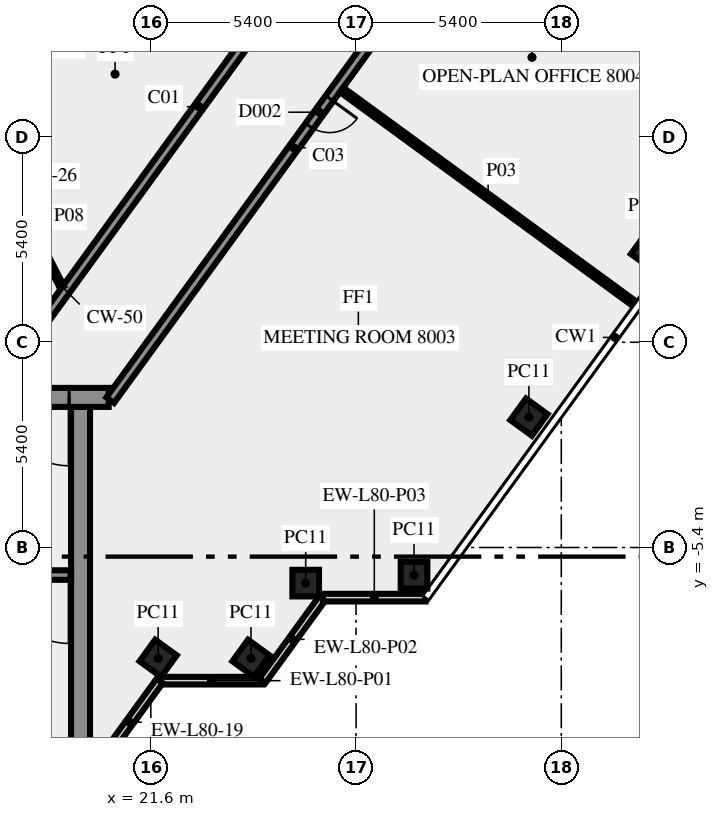
"""IFC4 building model, lengths in metres.
Left out: names, types, materials, properties, quantities, classifications, styles, units other than length and angle.
Written with IfcOpenShell. Run it as: python <this file> out.ifc"""

import sys

from ifc_helpers import new_model, si_unit, direction, frame, frame_2d, origin, origin_2d, place, context, subcontext, project, spatial, rectangle, extrude, element, fill, save


model = new_model("IFC4")
c1 = context("Model", 3, precision=1e-05, world=origin(), true_north=direction((0.0, 1.0)))
c2 = subcontext(c1, "Body", "Model", "MODEL_VIEW")
j1 = project(units=[si_unit("LENGTHUNIT", "METRE"), si_unit("PLANEANGLEUNIT", "RADIAN")], contexts=[c1])
p1 = place(None, origin())
s1 = spatial("IfcSite", under=j1, at=p1, CompositionType="ELEMENT")
p2 = place(p1, origin())
s2 = spatial("IfcBuilding", under=s1, at=p2, CompositionType="ELEMENT")
p3 = place(p2, frame((0.0, 0.0, 343.0)))
s3 = spatial("IfcBuildingStorey", under=s2, at=p3, CompositionType="ELEMENT", Elevation=343.0)
for number, where, z_axis, x_axis in (
    (1, (21.792, -8.315, 0.0), (0.0, 0.0, 1.0), (0.588, 0.809, 0.0)),
    (2, (24.235, -8.315, 0.0), (0.0, 0.0, 1.0), (0.588, 0.809, 0.0)),
    (3, (25.674, -6.337, 0.0), (0.0, 0.0, 1.0), (1.0, 0.0, 0.0)),
    (4, (28.525, -6.13, 0.0), (0.0, 0.0, 1.0), (1.0, 0.0, 0.0)),
    (5, (31.548, -1.969, 0.0), (0.0, 0.0, 1.0), (0.588, 0.809, 0.0)),
    (6, (34.722, 2.4, 0.0), (0.0, 0.0, 1.0), (0.588, 0.809, 0.0)),
):
    element("IfcColumn", number, at=place(p3, frame(where, z_axis=z_axis, x_axis=x_axis)), inside=s3, PredefinedType="COLUMN", context=c2, shape_type="SweptSolid", body=[
        extrude(rectangle(XDim=0.7, YDim=0.7, at=origin_2d()), origin(), (0.0, 0.0, 1.0), 3.65),
    ])
p4 = place(p3, frame((21.843, -8.904, 0.0), z_axis=(0.0, 0.0, 1.0), x_axis=(1.0, 0.0, 0.0)))
e7 = element("IfcWall", 7, at=p4, inside=s3, PredefinedType="SOLIDWALL", context=c2, shape_type="SweptSolid", body=[
    extrude(rectangle(XDim=2.7, YDim=0.2, at=frame_2d((1.35, 0.0))), origin(), (0.0, 0.0, 1.0), 3.65),
])
p5 = place(p3, frame((24.533, -8.909, 0.0), z_axis=(0.0, 0.0, 1.0), x_axis=(0.587720002413, 0.809064397168, 0.0)))
e8 = element("IfcWall", 8, at=p5, inside=s3, PredefinedType="SOLIDWALL", context=c2, shape_type="SweptSolid", body=[
    extrude(rectangle(XDim=2.7, YDim=0.2, at=frame_2d((1.35, 0.0))), origin(), (0.0, 0.0, 1.0), 3.65),
])
p6 = place(p3, frame((26.13, -6.719, 0.0), z_axis=(0.0, 0.0, 1.0), x_axis=(1.0, 0.0, 0.0)))
e9 = element("IfcWall", 9, at=p6, inside=s3, PredefinedType="SOLIDWALL", context=c2, shape_type="SweptSolid", body=[
    extrude(rectangle(XDim=2.7, YDim=0.2, at=frame_2d((1.35, 0.0))), origin(), (0.0, 0.0, 1.0), 3.65),
])
p7 = place(p3, frame((20.253, -11.083, 0.0), z_axis=(0.0, 0.0, 1.0), x_axis=(0.587766567315, 0.809030569476, 0.0)))
e10 = element("IfcWall", 10, at=p7, inside=s3, PredefinedType="SOLIDWALL", context=c2, shape_type="SweptSolid", body=[
    extrude(rectangle(XDim=2.688, YDim=0.2, at=frame_2d((1.344, 0.0))), origin(), (0.0, 0.0, 1.0), 3.65),
])
p8 = place(p3, frame((19.75, -10.5, 0.0), z_axis=(0.0, 0.0, 1.0), x_axis=(0.0, 1.0, 0.0)))
e11 = element("IfcWall", 11, at=p8, inside=s3, PredefinedType="SHEAR", context=c2, shape_type="SweptSolid", body=[
    extrude(rectangle(XDim=8.8, YDim=0.5, at=frame_2d((4.4, 0.0))), origin(), (0.0, 0.0, 1.0), 3.65),
])
p9 = place(p3, frame((19.5, -6.125, 0.0), z_axis=(0.0, 0.0, 1.0), x_axis=(-1.0, 0.0, 0.0)))
e12 = element("IfcWall", 12, at=p9, inside=s3, PredefinedType="SHEAR", context=c2, shape_type="SweptSolid", body=[
    extrude(rectangle(XDim=8.05, YDim=0.25, at=frame_2d((4.025, 0.0))), origin(), (0.0, 0.0, 1.0), 3.65),
])
p10 = place(p9, frame((0.05, 0.0, 0.0)))
e13 = element("IfcOpeningElement", 13, at=p10, cuts=e12, PredefinedType="OPENING", context=c2, shape_type="SweptSolid", body=[
    extrude(rectangle(XDim=1.8, YDim=2.1, at=frame_2d((0.9, 1.05))), frame((0.0, 0.135, 0.0), z_axis=(0.0, -1.0, 0.0), x_axis=(1.0, 0.0, 0.0)), (0.0, 0.0, 1.0), 0.27),
])
p11 = place(p3, frame((20.49, -1.45, 0.0), z_axis=(0.0, 0.0, 1.0), x_axis=(-1.0, 0.0, 0.0)))
e14 = element("IfcWall", 14, at=p11, inside=s3, PredefinedType="SHEAR", context=c2, shape_type="SweptSolid", body=[
    extrude(rectangle(XDim=40.98, YDim=0.5, at=frame_2d((20.49, 0.0))), origin(), (0.0, 0.0, 1.0), 3.65),
])
p12 = place(p11, frame((38.14, 0.0, 0.0)))
e15 = element("IfcOpeningElement", 15, at=p12, cuts=e14, PredefinedType="OPENING", context=c2, shape_type="SweptSolid", body=[
    extrude(rectangle(XDim=1.8, YDim=2.1, at=frame_2d((0.9, 1.05))), frame((0.0, 0.26, 0.0), z_axis=(0.0, -1.0, 0.0), x_axis=(1.0, 0.0, 0.0)), (0.0, 0.0, 1.0), 0.52),
])
p13 = place(p11, frame((36.728, 0.0, 0.0)))
e16 = element("IfcOpeningElement", 16, at=p13, cuts=e14, PredefinedType="OPENING", context=c2, shape_type="SweptSolid", body=[
    extrude(rectangle(XDim=0.8, YDim=2.1, at=frame_2d((0.4, 1.05))), frame((0.0, 0.26, 0.0), z_axis=(0.0, -1.0, 0.0), x_axis=(1.0, 0.0, 0.0)), (0.0, 0.0, 1.0), 0.52),
])
p14 = place(p11, frame((35.153, 0.0, 0.0)))
e17 = element("IfcOpeningElement", 17, at=p14, cuts=e14, PredefinedType="OPENING", context=c2, shape_type="SweptSolid", body=[
    extrude(rectangle(XDim=0.8, YDim=2.1, at=frame_2d((0.4, 1.05))), frame((0.0, 0.26, 0.0), z_axis=(0.0, -1.0, 0.0), x_axis=(1.0, 0.0, 0.0)), (0.0, 0.0, 1.0), 0.52),
])
p15 = place(p11, frame((32.94, 0.0, 0.0)))
e18 = element("IfcOpeningElement", 18, at=p15, cuts=e14, PredefinedType="OPENING", context=c2, shape_type="SweptSolid", body=[
    extrude(rectangle(XDim=0.9, YDim=2.1, at=frame_2d((0.45, 1.05))), frame((0.0, 0.26, 0.0), z_axis=(0.0, -1.0, 0.0), x_axis=(1.0, 0.0, 0.0)), (0.0, 0.0, 1.0), 0.52),
])
p16 = place(p11, frame((31.015, 0.0, 0.0)))
e19 = element("IfcOpeningElement", 19, at=p16, cuts=e14, PredefinedType="OPENING", context=c2, shape_type="SweptSolid", body=[
    extrude(rectangle(XDim=0.8, YDim=2.1, at=frame_2d((0.4, 1.05))), frame((0.0, 0.26, 0.0), z_axis=(0.0, -1.0, 0.0), x_axis=(1.0, 0.0, 0.0)), (0.0, 0.0, 1.0), 0.52),
])
p17 = place(p11, frame((24.765, 0.0, 0.0)))
e20 = element("IfcOpeningElement", 20, at=p17, cuts=e14, PredefinedType="OPENING", context=c2, shape_type="SweptSolid", body=[
    extrude(rectangle(XDim=0.8, YDim=2.1, at=frame_2d((0.4, 1.05))), frame((0.0, 0.26, 0.0), z_axis=(0.0, -1.0, 0.0), x_axis=(1.0, 0.0, 0.0)), (0.0, 0.0, 1.0), 0.52),
])
p18 = place(p11, frame((21.765, 0.0, 0.0)))
e21 = element("IfcOpeningElement", 21, at=p18, cuts=e14, PredefinedType="OPENING", context=c2, shape_type="SweptSolid", body=[
    extrude(rectangle(XDim=2.0, YDim=2.1, at=frame_2d((1.0, 1.05))), frame((0.0, 0.26, 0.0), z_axis=(0.0, -1.0, 0.0), x_axis=(1.0, 0.0, 0.0)), (0.0, 0.0, 1.0), 0.52),
])
p19 = place(p11, frame((14.002, 0.0, 0.0)))
e22 = element("IfcOpeningElement", 22, at=p19, cuts=e14, PredefinedType="OPENING", context=c2, shape_type="SweptSolid", body=[
    extrude(rectangle(XDim=0.9, YDim=2.1, at=frame_2d((0.45, 1.05))), frame((0.0, 0.26, 0.0), z_axis=(0.0, -1.0, 0.0), x_axis=(1.0, 0.0, 0.0)), (0.0, 0.0, 1.0), 0.52),
])
p20 = place(p11, frame((10.278, 0.0, 0.0)))
e23 = element("IfcOpeningElement", 23, at=p20, cuts=e14, PredefinedType="OPENING", context=c2, shape_type="SweptSolid", body=[
    extrude(rectangle(XDim=0.9, YDim=2.1, at=frame_2d((0.45, 1.05))), frame((0.0, 0.26, 0.0), z_axis=(0.0, -1.0, 0.0), x_axis=(1.0, 0.0, 0.0)), (0.0, 0.0, 1.0), 0.52),
])
p21 = place(p11, frame((7.14, 0.0, 0.0)))
e24 = element("IfcOpeningElement", 24, at=p21, cuts=e14, PredefinedType="OPENING", context=c2, shape_type="SweptSolid", body=[
    extrude(rectangle(XDim=0.9, YDim=2.1, at=frame_2d((0.45, 1.05))), frame((0.0, 0.26, 0.0), z_axis=(0.0, -1.0, 0.0), x_axis=(1.0, 0.0, 0.0)), (0.0, 0.0, 1.0), 0.52),
])
p22 = place(p11, frame((4.19, 0.0, 0.0)))
e25 = element("IfcOpeningElement", 25, at=p22, cuts=e14, PredefinedType="OPENING", context=c2, shape_type="SweptSolid", body=[
    extrude(rectangle(XDim=0.9, YDim=2.1, at=frame_2d((0.45, 1.05))), frame((0.0, 0.26, 0.0), z_axis=(0.0, -1.0, 0.0), x_axis=(1.0, 0.0, 0.0)), (0.0, 0.0, 1.0), 0.52),
])
p23 = place(p11, frame((1.04, 0.0, 0.0)))
e26 = element("IfcOpeningElement", 26, at=p23, cuts=e14, PredefinedType="OPENING", context=c2, shape_type="SweptSolid", body=[
    extrude(rectangle(XDim=1.8, YDim=2.1, at=frame_2d((0.9, 1.05))), frame((0.0, 0.26, 0.0), z_axis=(0.0, -1.0, 0.0), x_axis=(1.0, 0.0, 0.0)), (0.0, 0.0, 1.0), 0.52),
])
p24 = place(p3, frame((17.545, -1.125, 0.0), z_axis=(0.0, 0.0, 1.0), x_axis=(0.58779555165, 0.809009511354, 0.0)))
e27 = element("IfcWall", 27, at=p24, inside=s3, PredefinedType="SOLIDWALL", context=c2, shape_type="SweptSolid", body=[
    extrude(rectangle(XDim=18.103, YDim=0.25, at=frame_2d((9.052, 0.0))), origin(), (0.0, 0.0, 1.0), 3.65),
])
p25 = place(p24, frame((16.728, 0.0, 0.0)))
e28 = element("IfcOpeningElement", 28, at=p25, cuts=e27, PredefinedType="OPENING", context=c2, shape_type="SweptSolid", body=[
    extrude(rectangle(XDim=0.9, YDim=2.1, at=frame_2d((0.45, 1.05))), frame((0.0, 0.135, 0.0), z_axis=(0.0, -1.0, 0.0), x_axis=(1.0, 0.0, 0.0)), (0.0, 0.0, 1.0), 0.27),
])
p26 = place(p3, frame((30.183, 11.761, 0.0), z_axis=(0.0, 0.0, 1.0), x_axis=(-0.587781762867, -0.80901952958, 0.0)))
e29 = element("IfcWall", 29, at=p26, inside=s3, PredefinedType="SOLIDWALL", context=c2, shape_type="SweptSolid", body=[
    extrude(rectangle(XDim=16.42, YDim=0.25, at=frame_2d((8.21, 0.0))), origin(), (0.0, 0.0, 1.0), 3.65),
])
p27 = place(p26, frame((0.225, 0.0, 0.0)))
e30 = element("IfcOpeningElement", 30, at=p27, cuts=e29, PredefinedType="OPENING", context=c2, shape_type="SweptSolid", body=[
    extrude(rectangle(XDim=0.9, YDim=2.1, at=frame_2d((0.45, 1.05))), frame((0.0, 0.135, 0.0), z_axis=(0.0, -1.0, 0.0), x_axis=(1.0, 0.0, 0.0)), (0.0, 0.0, 1.0), 0.27),
])
p28 = place(p26, frame((6.605, 0.0, 0.0)))
e31 = element("IfcOpeningElement", 31, at=p28, cuts=e29, PredefinedType="OPENING", context=c2, shape_type="SweptSolid", body=[
    extrude(rectangle(XDim=0.9, YDim=2.1, at=frame_2d((0.45, 1.05))), frame((0.0, 0.135, 0.0), z_axis=(0.0, -1.0, 0.0), x_axis=(1.0, 0.0, 0.0)), (0.0, 0.0, 1.0), 0.27),
])
p29 = place(p3, frame((37.458, 6.76, 0.0), z_axis=(0.0, 0.0, 1.0), x_axis=(-0.809016295501, 0.587786214209, 0.0)))
e32 = element("IfcWall", 32, at=p29, inside=s3, PredefinedType="PARTITIONING", context=c2, shape_type="SweptSolid", body=[
    extrude(rectangle(XDim=8.7, YDim=0.15, at=frame_2d((4.35, 0.0))), origin(), (0.0, 0.0, 1.0), 3.65),
])
p30 = place(p3, frame((26.619, 6.643, 0.0), z_axis=(0.0, 0.0, 1.0), x_axis=(0.807594822539, -0.589737740532, 0.0)))
e33 = element("IfcWall", 33, at=p30, inside=s3, PredefinedType="PARTITIONING", context=c2, shape_type="SweptSolid", body=[
    extrude(rectangle(XDim=9.55, YDim=0.15, at=frame_2d((4.775, 0.0))), origin(), (0.0, 0.0, 1.0), 2.95),
])
p31 = place(p3, frame((18.0, 3.925, 0.0), z_axis=(0.0, 0.0, 1.0), x_axis=(0.453950796792, -0.891026752736, 0.0)))
e34 = element("IfcWall", 34, at=p31, inside=s3, PredefinedType="PARTITIONING", context=c2, shape_type="SweptSolid", body=[
    extrude(rectangle(XDim=2.778, YDim=0.12, at=frame_2d((1.389, 0.0))), origin(), (0.0, 0.0, 1.0), 3.65),
])
p32 = place(p10, origin())
e35 = element("IfcDoor", 35, at=p32, inside=s3, OperationType="DOUBLE_DOOR_SINGLE_SWING", PredefinedType="DOOR", context=c2, shape_type="SweptSolid", body=[
    extrude(rectangle(XDim=1.8, YDim=2.1, at=frame_2d((0.9, 1.05))), frame((0.0, 0.025, 0.0), z_axis=(0.0, -1.0, 0.0), x_axis=(1.0, 0.0, 0.0)), (0.0, 0.0, 1.0), 0.05),
])
fill(e13, e35)
p33 = place(p23, origin())
e36 = element("IfcDoor", 36, at=p33, inside=s3, OperationType="DOUBLE_DOOR_SINGLE_SWING", PredefinedType="DOOR", context=c2, shape_type="SweptSolid", body=[
    extrude(rectangle(XDim=1.8, YDim=2.1, at=frame_2d((0.9, 1.05))), frame((0.0, 0.025, 0.0), z_axis=(0.0, -1.0, 0.0), x_axis=(1.0, 0.0, 0.0)), (0.0, 0.0, 1.0), 0.05),
])
fill(e26, e36)
p34 = place(p28, origin())
e37 = element("IfcDoor", 37, at=p34, inside=s3, OperationType="SINGLE_SWING_LEFT", PredefinedType="DOOR", context=c2, shape_type="SweptSolid", body=[
    extrude(rectangle(XDim=0.9, YDim=2.1, at=frame_2d((0.45, 1.05))), frame((0.0, 0.025, 0.0), z_axis=(0.0, -1.0, 0.0), x_axis=(1.0, 0.0, 0.0)), (0.0, 0.0, 1.0), 0.05),
])
fill(e31, e37)
save(model, sys.argv[1])
